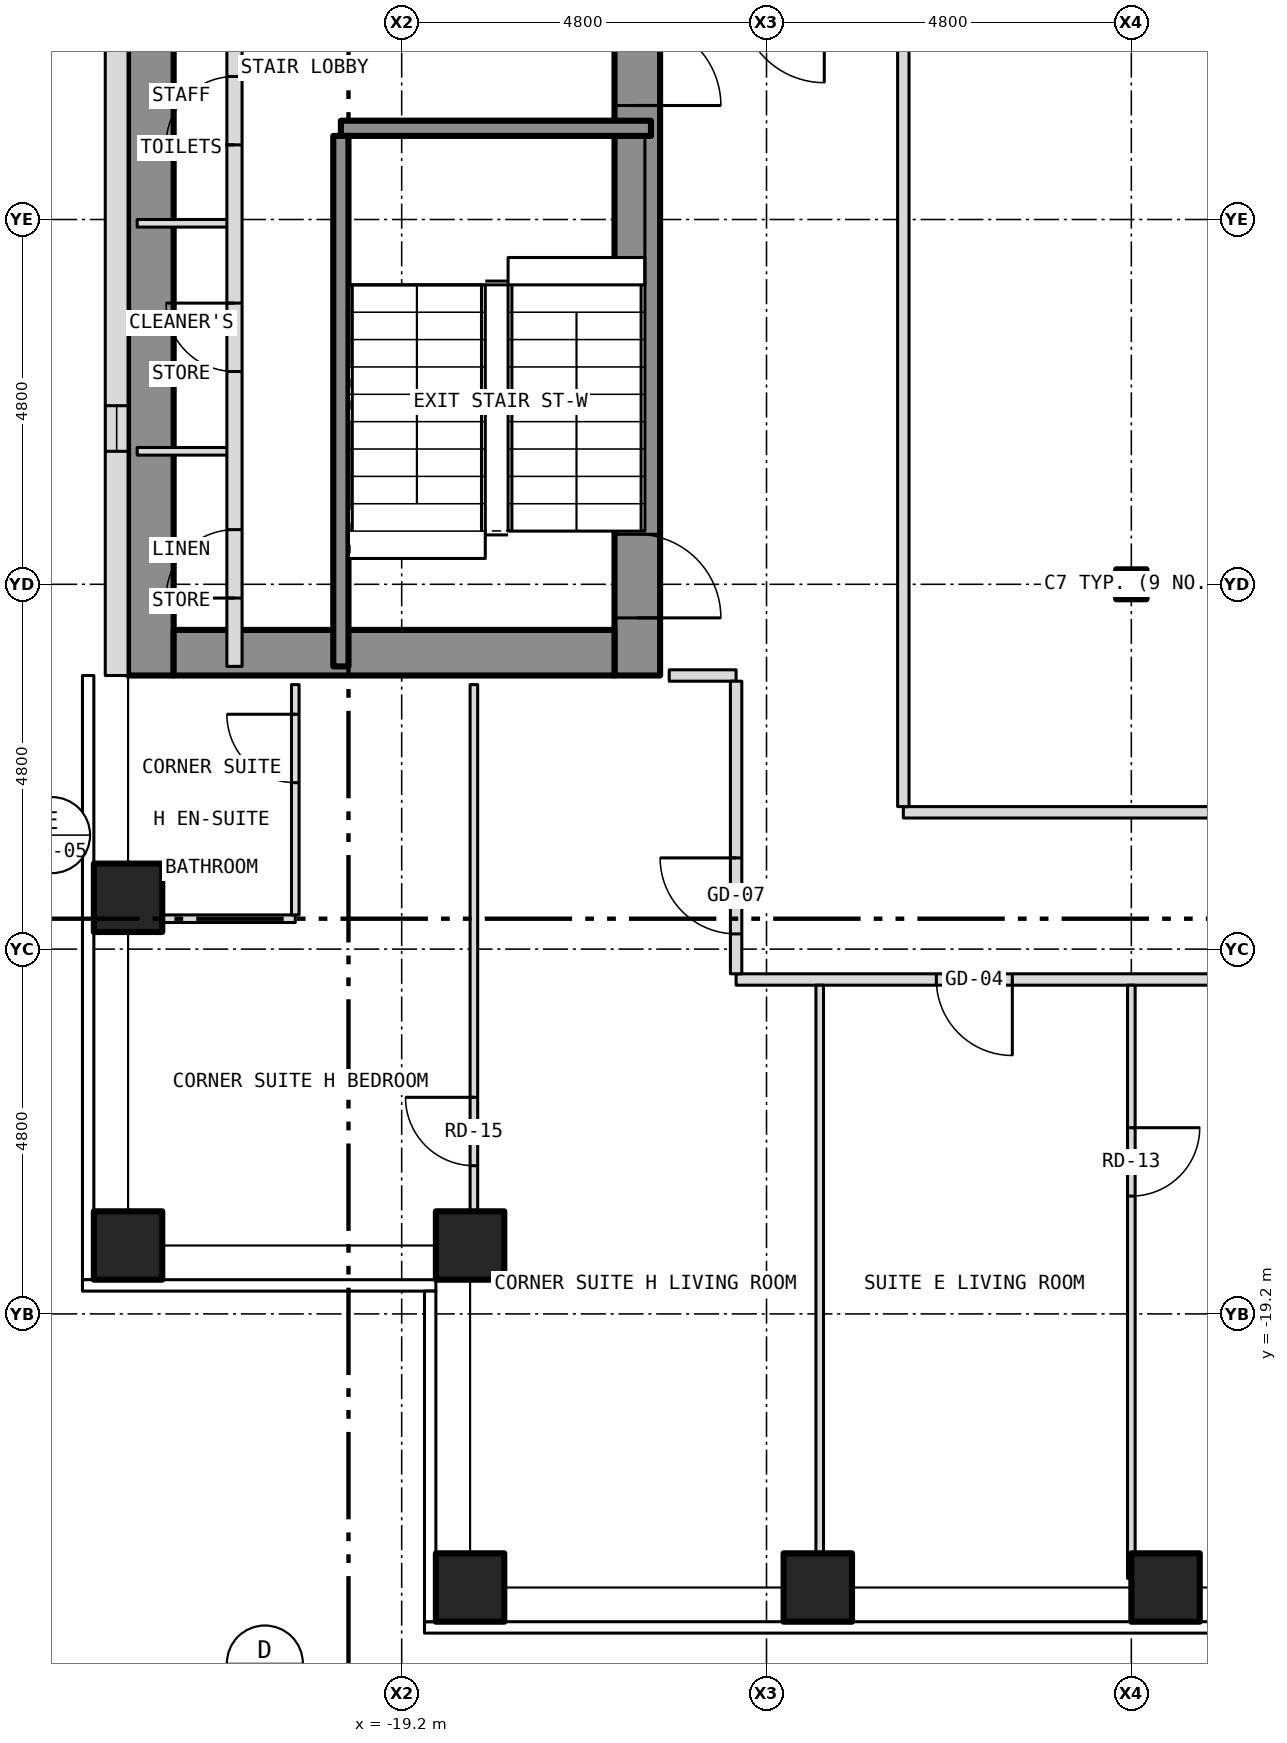
"""IFC4 building model, lengths in metres.
Left out: names, types, materials, properties, quantities, classifications, styles, units other than length and angle.
Written with IfcOpenShell. Run it as: python <this file> out.ifc"""

import sys

from ifc_helpers import new_model, si_unit, direction, frame, frame_2d, origin, origin_2d, place, context, subcontext, project, spatial, rectangle, hollow_rectangle, i_section, extrude, element, fill, save


model = new_model("IFC4")
c1 = context("Model", 3, precision=1e-05, world=origin(), true_north=direction((0.0, 1.0)))
c2 = subcontext(c1, "Body", "Model", "MODEL_VIEW")
j1 = project(units=[si_unit("LENGTHUNIT", "METRE"), si_unit("PLANEANGLEUNIT", "RADIAN")], contexts=[c1])
p1 = place(None, origin())
s1 = spatial("IfcSite", under=j1, at=p1, CompositionType="ELEMENT")
p2 = place(p1, origin())
s2 = spatial("IfcBuilding", under=s1, at=p2, CompositionType="ELEMENT")
p3 = place(p2, frame((0.0, 0.0, 110.0)))
s3 = spatial("IfcBuildingStorey", under=s2, at=p3, CompositionType="ELEMENT", Elevation=110.0)
for number, where, z_axis, x_axis in (
    (1, (-18.3, -22.8, -0.15), (0.0, 0.0, 1.0), (1.0, 0.0, 0.0)),
    (2, (-13.725, -22.8, -0.15), (0.0, 0.0, 1.0), (1.0, 0.0, 0.0)),
    (3, (-9.15, -22.8, -0.15), (0.0, 0.0, 1.0), (1.0, 0.0, 0.0)),
    (4, (-22.8, -18.3, -0.15), (0.0, 0.0, 1.0), (1.0, 0.0, 0.0)),
    (5, (-22.8, -13.725, -0.15), (0.0, 0.0, 1.0), (1.0, 0.0, 0.0)),
    (6, (-18.3, -18.3, -0.15), (0.0, 0.0, 1.0), (1.0, 0.0, 0.0)),
):
    element("IfcColumn", number, at=place(p3, frame(where, z_axis=z_axis, x_axis=x_axis)), inside=s3, PredefinedType="COLUMN", context=c2, shape_type="SweptSolid", body=[
        extrude(hollow_rectangle(XDim=0.9, YDim=0.9, WallThickness=0.05, at=origin_2d()), origin(), (0.0, 0.0, 1.0), 3.5),
    ])
p4 = place(p3, frame((-9.6, -9.6, -0.15), z_axis=(0.0, 0.0, 1.0), x_axis=(1.0, 0.0, 0.0)))
e7 = element("IfcColumn", 7, at=p4, inside=s3, PredefinedType="COLUMN", context=c2, shape_type="SweptSolid", body=[
    extrude(i_section(OverallWidth=0.399, OverallDepth=0.394, WebThickness=0.023, FlangeThickness=0.037, at=origin_2d()), origin(), (0.0, 0.0, 1.0), 3.5),
])
p5 = place(p3, frame((-16.1, -10.8, 0.0), z_axis=(0.0, 0.0, 1.0), x_axis=(0.0, 1.0, 0.0)))
e8 = element("IfcWall", 8, at=p5, inside=s3, PredefinedType="SHEAR", context=c2, shape_type="SweptSolid", body=[
    extrude(rectangle(XDim=21.6, YDim=0.6, at=frame_2d((10.8, 0.0))), origin(), (0.0, 0.0, 1.0), 3.25),
])
p6 = place(p5, frame((9.4, 0.0, 0.0)))
e9 = element("IfcOpeningElement", 9, at=p6, cuts=e8, PredefinedType="OPENING", context=c2, shape_type="SweptSolid", body=[
    extrude(rectangle(XDim=1.1, YDim=2.1, at=frame_2d((0.55, 1.05))), frame((0.0, 0.312, 0.0), z_axis=(0.0, -1.0, 0.0), x_axis=(1.0, 0.0, 0.0)), (0.0, 0.0, 1.0), 0.624),
])
p7 = place(p5, frame((11.5, 0.0, 0.0)))
e10 = element("IfcOpeningElement", 10, at=p7, cuts=e8, PredefinedType="OPENING", context=c2, shape_type="SweptSolid", body=[
    extrude(rectangle(XDim=1.1, YDim=2.1, at=frame_2d((0.55, 1.05))), frame((0.0, 0.312, 0.0), z_axis=(0.0, -1.0, 0.0), x_axis=(1.0, 0.0, 0.0)), (0.0, 0.0, 1.0), 0.624),
])
p8 = place(p5, frame((13.6, 0.0, 0.0)))
e11 = element("IfcOpeningElement", 11, at=p8, cuts=e8, PredefinedType="OPENING", context=c2, shape_type="SweptSolid", body=[
    extrude(rectangle(XDim=1.1, YDim=2.1, at=frame_2d((0.55, 1.05))), frame((0.0, 0.312, 0.0), z_axis=(0.0, -1.0, 0.0), x_axis=(1.0, 0.0, 0.0)), (0.0, 0.0, 1.0), 0.624),
])
p9 = place(p5, frame((15.7, 0.0, 0.0)))
e12 = element("IfcOpeningElement", 12, at=p9, cuts=e8, PredefinedType="OPENING", context=c2, shape_type="SweptSolid", body=[
    extrude(rectangle(XDim=1.1, YDim=2.1, at=frame_2d((0.55, 1.05))), frame((0.0, 0.312, 0.0), z_axis=(0.0, -1.0, 0.0), x_axis=(1.0, 0.0, 0.0)), (0.0, 0.0, 1.0), 0.624),
])
p10 = place(p5, frame((17.8, 0.0, 0.0)))
e13 = element("IfcOpeningElement", 13, at=p10, cuts=e8, PredefinedType="OPENING", context=c2, shape_type="SweptSolid", body=[
    extrude(rectangle(XDim=1.1, YDim=2.1, at=frame_2d((0.55, 1.05))), frame((0.0, 0.312, 0.0), z_axis=(0.0, -1.0, 0.0), x_axis=(1.0, 0.0, 0.0)), (0.0, 0.0, 1.0), 0.624),
])
p11 = place(p5, frame((0.758, 0.0, 0.0)))
e14 = element("IfcOpeningElement", 14, at=p11, cuts=e8, PredefinedType="OPENING", context=c2, shape_type="SweptSolid", body=[
    extrude(rectangle(XDim=1.1, YDim=2.1, at=frame_2d((0.55, 1.05))), frame((0.0, 0.312, 0.0), z_axis=(0.0, -1.0, 0.0), x_axis=(1.0, 0.0, 0.0)), (0.0, 0.0, 1.0), 0.624),
])
p12 = place(p5, frame((7.5, 0.0, 0.0)))
e15 = element("IfcOpeningElement", 15, at=p12, cuts=e8, PredefinedType="OPENING", context=c2, shape_type="SweptSolid", body=[
    extrude(rectangle(XDim=1.1, YDim=2.1, at=frame_2d((0.55, 1.05))), frame((0.0, 0.312, 0.0), z_axis=(0.0, -1.0, 0.0), x_axis=(1.0, 0.0, 0.0)), (0.0, 0.0, 1.0), 0.624),
])
p13 = place(p3, frame((-22.5, -10.8, 0.0), z_axis=(0.0, 0.0, 1.0), x_axis=(0.0, 1.0, 0.0)))
e16 = element("IfcWall", 16, at=p13, inside=s3, PredefinedType="SHEAR", context=c2, shape_type="SweptSolid", body=[
    extrude(rectangle(XDim=21.6, YDim=0.6, at=frame_2d((10.8, 0.0))), origin(), (0.0, 0.0, 1.0), 3.25),
])
p14 = place(p3, frame((-22.2, -10.5, 0.0), z_axis=(0.0, 0.0, 1.0), x_axis=(1.0, 0.0, 0.0)))
e17 = element("IfcWall", 17, at=p14, inside=s3, PredefinedType="SHEAR", context=c2, shape_type="SweptSolid", body=[
    extrude(rectangle(XDim=5.8, YDim=0.6, at=frame_2d((2.9, 0.0))), origin(), (0.0, 0.0, 1.0), 3.25),
])
p15 = place(p3, frame((-22.95, 10.8, 0.0), z_axis=(0.0, 0.0, 1.0), x_axis=(0.0, -1.0, 0.0)))
e18 = element("IfcWall", 18, at=p15, inside=s3, PredefinedType="SOLIDWALL", context=c2, shape_type="SweptSolid", body=[
    extrude(rectangle(XDim=21.6, YDim=0.3, at=frame_2d((10.8, 0.0))), origin(), (0.0, 0.0, 1.0), 3.5),
])
p16 = place(p15, frame((18.05, 0.0, 1.0)))
e19 = element("IfcOpeningElement", 19, at=p16, cuts=e18, PredefinedType="OPENING", context=c2, shape_type="SweptSolid", body=[
    extrude(rectangle(XDim=0.6, YDim=1.5, at=frame_2d((0.3, 0.75))), frame((0.0, 0.162, 0.0), z_axis=(0.0, -1.0, 0.0), x_axis=(1.0, 0.0, 0.0)), (0.0, 0.0, 1.0), 0.324),
])
p17 = place(p3, frame((-14.8, -14.8, 0.0), z_axis=(0.0, 0.0, 1.0), x_axis=(1.0, 0.0, 0.0)))
e20 = element("IfcWall", 20, at=p17, inside=s3, PredefinedType="PARTITIONING", context=c2, shape_type="SweptSolid", body=[
    extrude(rectangle(XDim=29.6, YDim=0.15, at=frame_2d((14.8, 0.0))), origin(), (0.0, 0.0, 1.0), 3.35),
])
p18 = place(p17, frame((2.634, 0.0, 0.0)))
e21 = element("IfcOpeningElement", 21, at=p18, cuts=e20, PredefinedType="OPENING", context=c2, shape_type="SweptSolid", body=[
    extrude(rectangle(XDim=1.0, YDim=2.1, at=frame_2d((0.5, 1.05))), frame((0.0, 0.087, 0.0), z_axis=(0.0, -1.0, 0.0), x_axis=(1.0, 0.0, 0.0)), (0.0, 0.0, 1.0), 0.174),
])
p19 = place(p17, frame((20.362, 0.0, 0.0)))
e22 = element("IfcOpeningElement", 22, at=p19, cuts=e20, PredefinedType="OPENING", context=c2, shape_type="SweptSolid", body=[
    extrude(rectangle(XDim=1.0, YDim=2.1, at=frame_2d((0.5, 1.05))), frame((0.0, 0.087, 0.0), z_axis=(0.0, -1.0, 0.0), x_axis=(1.0, 0.0, 0.0)), (0.0, 0.0, 1.0), 0.174),
])
p20 = place(p17, frame((26.837, 0.0, 0.0)))
e23 = element("IfcOpeningElement", 23, at=p20, cuts=e20, PredefinedType="OPENING", context=c2, shape_type="SweptSolid", body=[
    extrude(rectangle(XDim=1.0, YDim=2.1, at=frame_2d((0.5, 1.05))), frame((0.0, 0.087, 0.0), z_axis=(0.0, -1.0, 0.0), x_axis=(1.0, 0.0, 0.0)), (0.0, 0.0, 1.0), 0.174),
])
p21 = place(p3, frame((-22.68, -14.0, 0.0), z_axis=(0.0, 0.0, 1.0), x_axis=(1.0, 0.0, 0.0)))
e24 = element("IfcWall", 24, at=p21, inside=s3, PredefinedType="PARTITIONING", context=c2, shape_type="SweptSolid", body=[
    extrude(rectangle(XDim=2.08, YDim=0.1, at=frame_2d((1.04, 0.0))), origin(), (0.0, 0.0, 1.0), 3.35),
])
p22 = place(p3, frame((-12.6, -12.6, 0.0), z_axis=(0.0, 0.0, 1.0), x_axis=(1.0, 0.0, 0.0)))
e25 = element("IfcWall", 25, at=p22, inside=s3, PredefinedType="PARTITIONING", context=c2, shape_type="SweptSolid", body=[
    extrude(rectangle(XDim=16.7, YDim=0.15, at=frame_2d((8.35, 0.0))), origin(), (0.0, 0.0, 1.0), 3.35),
])
p23 = place(p3, frame((-15.68, -10.8, 0.0), z_axis=(0.0, 0.0, 1.0), x_axis=(1.0, 0.0, 0.0)))
e26 = element("IfcWall", 26, at=p23, inside=s3, PredefinedType="PARTITIONING", context=c2, shape_type="SweptSolid", body=[
    extrude(rectangle(XDim=0.88, YDim=0.15, at=frame_2d((0.44, 0.0))), origin(), (0.0, 0.0, 1.0), 3.35),
])
for number, where, z_axis, x_axis in (
    (27, (-22.68, -7.85, 0.0), (0.0, 0.0, 1.0), (1.0, 0.0, 0.0)),
    (28, (-22.68, -4.85, 0.0), (0.0, 0.0, 1.0), (1.0, 0.0, 0.0)),
):
    element("IfcWall", number, at=place(p3, frame(where, z_axis=z_axis, x_axis=x_axis)), inside=s3, PredefinedType="PARTITIONING", context=c2, shape_type="SweptSolid", body=[
        extrude(rectangle(XDim=1.28, YDim=0.1, at=frame_2d((0.64, 0.0))), origin(), (0.0, 0.0, 1.0), 3.25),
    ])
p24 = place(p3, frame((-20.0, -3.6, 0.0), z_axis=(0.0, 0.0, 1.0), x_axis=(1.0, 0.0, 0.0)))
e29 = element("IfcWall", 29, at=p24, inside=s3, PredefinedType="SHEAR", context=c2, shape_type="SweptSolid", body=[
    extrude(rectangle(XDim=4.08, YDim=0.2, at=frame_2d((2.04, 0.0))), origin(), (0.0, 0.0, 1.0), 3.25),
])
p25 = place(p3, frame((-21.4, -10.68, 0.0), z_axis=(0.0, 0.0, 1.0), x_axis=(0.0, 1.0, 0.0)))
e30 = element("IfcWall", 30, at=p25, inside=s3, PredefinedType="PARTITIONING", context=c2, shape_type="SweptSolid", body=[
    extrude(rectangle(XDim=8.68, YDim=0.2, at=frame_2d((4.34, 0.0))), origin(), (0.0, 0.0, 1.0), 3.25),
])
p26 = place(p25, frame((0.899, 0.0, 0.0)))
e31 = element("IfcOpeningElement", 31, at=p26, cuts=e30, PredefinedType="OPENING", context=c2, shape_type="SweptSolid", body=[
    extrude(rectangle(XDim=0.9, YDim=2.1, at=frame_2d((0.45, 1.05))), frame((0.0, 0.112, 0.0), z_axis=(0.0, -1.0, 0.0), x_axis=(1.0, 0.0, 0.0)), (0.0, 0.0, 1.0), 0.224),
])
p27 = place(p25, frame((3.88, 0.0, 0.0)))
e32 = element("IfcOpeningElement", 32, at=p27, cuts=e30, PredefinedType="OPENING", context=c2, shape_type="SweptSolid", body=[
    extrude(rectangle(XDim=0.9, YDim=2.1, at=frame_2d((0.45, 1.05))), frame((0.0, 0.112, 0.0), z_axis=(0.0, -1.0, 0.0), x_axis=(1.0, 0.0, 0.0)), (0.0, 0.0, 1.0), 0.224),
])
p28 = place(p25, frame((6.862, 0.0, 0.0)))
e33 = element("IfcOpeningElement", 33, at=p28, cuts=e30, PredefinedType="OPENING", context=c2, shape_type="SweptSolid", body=[
    extrude(rectangle(XDim=0.9, YDim=2.1, at=frame_2d((0.45, 1.05))), frame((0.0, 0.112, 0.0), z_axis=(0.0, -1.0, 0.0), x_axis=(1.0, 0.0, 0.0)), (0.0, 0.0, 1.0), 0.224),
])
p29 = place(p3, frame((-20.6, -13.95, 0.0), z_axis=(0.0, 0.0, 1.0), x_axis=(0.0, 1.0, 0.0)))
e34 = element("IfcWall", 34, at=p29, inside=s3, PredefinedType="PARTITIONING", context=c2, shape_type="SweptSolid", body=[
    extrude(rectangle(XDim=3.03, YDim=0.1, at=frame_2d((1.515, 0.0))), origin(), (0.0, 0.0, 1.0), 3.35),
])
p30 = place(p29, frame((1.74, 0.0, 0.0)))
e35 = element("IfcOpeningElement", 35, at=p30, cuts=e34, PredefinedType="OPENING", context=c2, shape_type="SweptSolid", body=[
    extrude(rectangle(XDim=0.9, YDim=2.1, at=frame_2d((0.45, 1.05))), frame((0.0, 0.062, 0.0), z_axis=(0.0, -1.0, 0.0), x_axis=(1.0, 0.0, 0.0)), (0.0, 0.0, 1.0), 0.124),
])
p31 = place(p3, frame((-20.0, -10.68, 0.0), z_axis=(0.0, 0.0, 1.0), x_axis=(0.0, 1.0, 0.0)))
e36 = element("IfcWall", 36, at=p31, inside=s3, PredefinedType="SHEAR", context=c2, shape_type="SweptSolid", body=[
    extrude(rectangle(XDim=6.98, YDim=0.2, at=frame_2d((3.49, 0.0))), origin(), (0.0, 0.0, 1.0), 3.25),
])
p32 = place(p3, frame((-18.25, -18.191, 0.0), z_axis=(0.0, 0.0, 1.0), x_axis=(0.0, 1.0, 0.0)))
e37 = element("IfcWall", 37, at=p32, inside=s3, PredefinedType="PARTITIONING", context=c2, shape_type="SweptSolid", body=[
    extrude(rectangle(XDim=7.271, YDim=0.1, at=frame_2d((3.635, 0.0))), origin(), (0.0, 0.0, 1.0), 3.35),
])
p33 = place(p32, frame((0.941, 0.0, 0.0)))
e38 = element("IfcOpeningElement", 38, at=p33, cuts=e37, PredefinedType="OPENING", context=c2, shape_type="SweptSolid", body=[
    extrude(rectangle(XDim=0.9, YDim=2.1, at=frame_2d((0.45, 1.05))), frame((0.0, 0.062, 0.0), z_axis=(0.0, -1.0, 0.0), x_axis=(1.0, 0.0, 0.0)), (0.0, 0.0, 1.0), 0.124),
])
p34 = place(p3, frame((-14.8, -14.725, 0.0), z_axis=(0.0, 0.0, 1.0), x_axis=(0.0, 1.0, 0.0)))
e39 = element("IfcWall", 39, at=p34, inside=s3, PredefinedType="PARTITIONING", context=c2, shape_type="SweptSolid", body=[
    extrude(rectangle(XDim=3.85, YDim=0.15, at=frame_2d((1.925, 0.0))), origin(), (0.0, 0.0, 1.0), 3.35),
])
p35 = place(p34, frame((0.525, 0.0, 0.0)))
e40 = element("IfcOpeningElement", 40, at=p35, cuts=e39, PredefinedType="OPENING", context=c2, shape_type="SweptSolid", body=[
    extrude(rectangle(XDim=1.0, YDim=2.1, at=frame_2d((0.5, 1.05))), frame((0.0, 0.087, 0.0), z_axis=(0.0, -1.0, 0.0), x_axis=(1.0, 0.0, 0.0)), (0.0, 0.0, 1.0), 0.174),
])
p36 = place(p3, frame((-13.7, -22.68, 0.0), z_axis=(0.0, 0.0, 1.0), x_axis=(0.0, 1.0, 0.0)))
e41 = element("IfcWall", 41, at=p36, inside=s3, PredefinedType="PARTITIONING", context=c2, shape_type="SweptSolid", body=[
    extrude(rectangle(XDim=7.805, YDim=0.1, at=frame_2d((3.902, 0.0))), origin(), (0.0, 0.0, 1.0), 3.35),
])
p37 = place(p3, frame((-12.6, -12.525, 0.0), z_axis=(0.0, 0.0, 1.0), x_axis=(0.0, 1.0, 0.0)))
e42 = element("IfcWall", 42, at=p37, inside=s3, PredefinedType="PARTITIONING", context=c2, shape_type="SweptSolid", body=[
    extrude(rectangle(XDim=10.525, YDim=0.15, at=frame_2d((5.262, 0.0))), origin(), (0.0, 0.0, 1.0), 3.35),
])
p38 = place(p3, frame((-9.6, -22.68, 0.0), z_axis=(0.0, 0.0, 1.0), x_axis=(0.0, 1.0, 0.0)))
e43 = element("IfcWall", 43, at=p38, inside=s3, PredefinedType="PARTITIONING", context=c2, shape_type="SweptSolid", body=[
    extrude(rectangle(XDim=0.33, YDim=0.1, at=frame_2d((0.165, 0.0))), origin(), (0.0, 0.0, 1.0), 3.35),
])
p39 = place(p3, frame((-9.6, -22.35, 0.0), z_axis=(0.0, 0.0, 1.0), x_axis=(0.0, 1.0, 0.0)))
e44 = element("IfcWall", 44, at=p39, inside=s3, PredefinedType="PARTITIONING", context=c2, shape_type="SweptSolid", body=[
    extrude(rectangle(XDim=7.475, YDim=0.1, at=frame_2d((3.738, 0.0))), origin(), (0.0, 0.0, 1.0), 2.728),
])
p40 = place(p39, frame((4.7, 0.0, 0.0)))
e45 = element("IfcOpeningElement", 45, at=p40, cuts=e44, PredefinedType="OPENING", context=c2, shape_type="SweptSolid", body=[
    extrude(rectangle(XDim=0.9, YDim=2.1, at=frame_2d((0.45, 1.05))), frame((0.0, 0.062, 0.0), z_axis=(0.0, -1.0, 0.0), x_axis=(1.0, 0.0, 0.0)), (0.0, 0.0, 1.0), 0.124),
])
p41 = place(p16, origin())
e46 = element("IfcWindow", 46, at=p41, inside=s3, PartitioningType="SINGLE_PANEL", PredefinedType="WINDOW", context=c2, shape_type="SweptSolid", body=[
    extrude(rectangle(XDim=0.6, YDim=1.5, at=frame_2d((0.3, 0.75))), frame((0.0, -0.06, 0.0), z_axis=(0.0, -1.0, 0.0), x_axis=(1.0, 0.0, 0.0)), (0.0, 0.0, 1.0), 0.06),
])
fill(e19, e46)
p42 = place(p11, origin())
e47 = element("IfcDoor", 47, at=p42, inside=s3, OperationType="SINGLE_SWING_LEFT", PredefinedType="DOOR", context=c2, shape_type="SweptSolid", body=[
    extrude(rectangle(XDim=1.1, YDim=2.1, at=frame_2d((0.55, 1.05))), frame((0.0, 0.025, 0.0), z_axis=(0.0, -1.0, 0.0), x_axis=(1.0, 0.0, 0.0)), (0.0, 0.0, 1.0), 0.05),
])
fill(e14, e47)
p43 = place(p12, origin())
e48 = element("IfcDoor", 48, at=p43, inside=s3, OperationType="SINGLE_SWING_LEFT", PredefinedType="DOOR", context=c2, shape_type="SweptSolid", body=[
    extrude(rectangle(XDim=1.1, YDim=2.1, at=frame_2d((0.55, 1.05))), frame((0.0, 0.025, 0.0), z_axis=(0.0, -1.0, 0.0), x_axis=(1.0, 0.0, 0.0)), (0.0, 0.0, 1.0), 0.05),
])
fill(e15, e48)
p44 = place(p26, origin())
e49 = element("IfcDoor", 49, at=p44, inside=s3, OperationType="SINGLE_SWING_LEFT", PredefinedType="DOOR", context=c2, shape_type="SweptSolid", body=[
    extrude(rectangle(XDim=0.9, YDim=2.1, at=frame_2d((0.45, 1.05))), frame((0.0, 0.025, 0.0), z_axis=(0.0, -1.0, 0.0), x_axis=(1.0, 0.0, 0.0)), (0.0, 0.0, 1.0), 0.05),
])
fill(e31, e49)
p45 = place(p27, origin())
e50 = element("IfcDoor", 50, at=p45, inside=s3, OperationType="SINGLE_SWING_RIGHT", PredefinedType="DOOR", context=c2, shape_type="SweptSolid", body=[
    extrude(rectangle(XDim=0.9, YDim=2.1, at=frame_2d((0.45, 1.05))), frame((0.0, 0.025, 0.0), z_axis=(0.0, -1.0, 0.0), x_axis=(1.0, 0.0, 0.0)), (0.0, 0.0, 1.0), 0.05),
])
fill(e32, e50)
p46 = place(p28, origin())
e51 = element("IfcDoor", 51, at=p46, inside=s3, OperationType="SINGLE_SWING_LEFT", PredefinedType="DOOR", context=c2, shape_type="SweptSolid", body=[
    extrude(rectangle(XDim=0.9, YDim=2.1, at=frame_2d((0.45, 1.05))), frame((0.0, 0.025, 0.0), z_axis=(0.0, -1.0, 0.0), x_axis=(1.0, 0.0, 0.0)), (0.0, 0.0, 1.0), 0.05),
])
fill(e33, e51)
p47 = place(p18, origin())
e52 = element("IfcDoor", 52, at=p47, inside=s3, OperationType="SINGLE_SWING_RIGHT", PredefinedType="DOOR", context=c2, shape_type="SweptSolid", body=[
    extrude(rectangle(XDim=1.0, YDim=2.1, at=frame_2d((0.5, 1.05))), frame((0.0, 0.025, 0.0), z_axis=(0.0, -1.0, 0.0), x_axis=(1.0, 0.0, 0.0)), (0.0, 0.0, 1.0), 0.05),
])
fill(e21, e52)
p48 = place(p40, origin())
e53 = element("IfcDoor", 53, at=p48, inside=s3, OperationType="SINGLE_SWING_RIGHT", PredefinedType="DOOR", context=c2, shape_type="SweptSolid", body=[
    extrude(rectangle(XDim=0.9, YDim=2.1, at=frame_2d((0.45, 1.05))), frame((0.0, 0.025, 0.0), z_axis=(0.0, -1.0, 0.0), x_axis=(1.0, 0.0, 0.0)), (0.0, 0.0, 1.0), 0.05),
])
fill(e45, e53)
p49 = place(p35, origin())
e54 = element("IfcDoor", 54, at=p49, inside=s3, OperationType="SINGLE_SWING_RIGHT", PredefinedType="DOOR", context=c2, shape_type="SweptSolid", body=[
    extrude(rectangle(XDim=1.0, YDim=2.1, at=frame_2d((0.5, 1.05))), frame((0.0, 0.025, 0.0), z_axis=(0.0, -1.0, 0.0), x_axis=(1.0, 0.0, 0.0)), (0.0, 0.0, 1.0), 0.05),
])
fill(e40, e54)
p50 = place(p33, origin())
e55 = element("IfcDoor", 55, at=p50, inside=s3, OperationType="SINGLE_SWING_RIGHT", PredefinedType="DOOR", context=c2, shape_type="SweptSolid", body=[
    extrude(rectangle(XDim=0.9, YDim=2.1, at=frame_2d((0.45, 1.05))), frame((0.0, 0.025, 0.0), z_axis=(0.0, -1.0, 0.0), x_axis=(1.0, 0.0, 0.0)), (0.0, 0.0, 1.0), 0.05),
])
fill(e38, e55)
p51 = place(p30, origin())
e56 = element("IfcDoor", 56, at=p51, inside=s3, OperationType="SINGLE_SWING_RIGHT", PredefinedType="DOOR", context=c2, shape_type="SweptSolid", body=[
    extrude(rectangle(XDim=0.9, YDim=2.1, at=frame_2d((0.45, 1.05))), frame((0.0, 0.025, 0.0), z_axis=(0.0, -1.0, 0.0), x_axis=(1.0, 0.0, 0.0)), (0.0, 0.0, 1.0), 0.05),
])
fill(e35, e56)
save(model, sys.argv[1])
